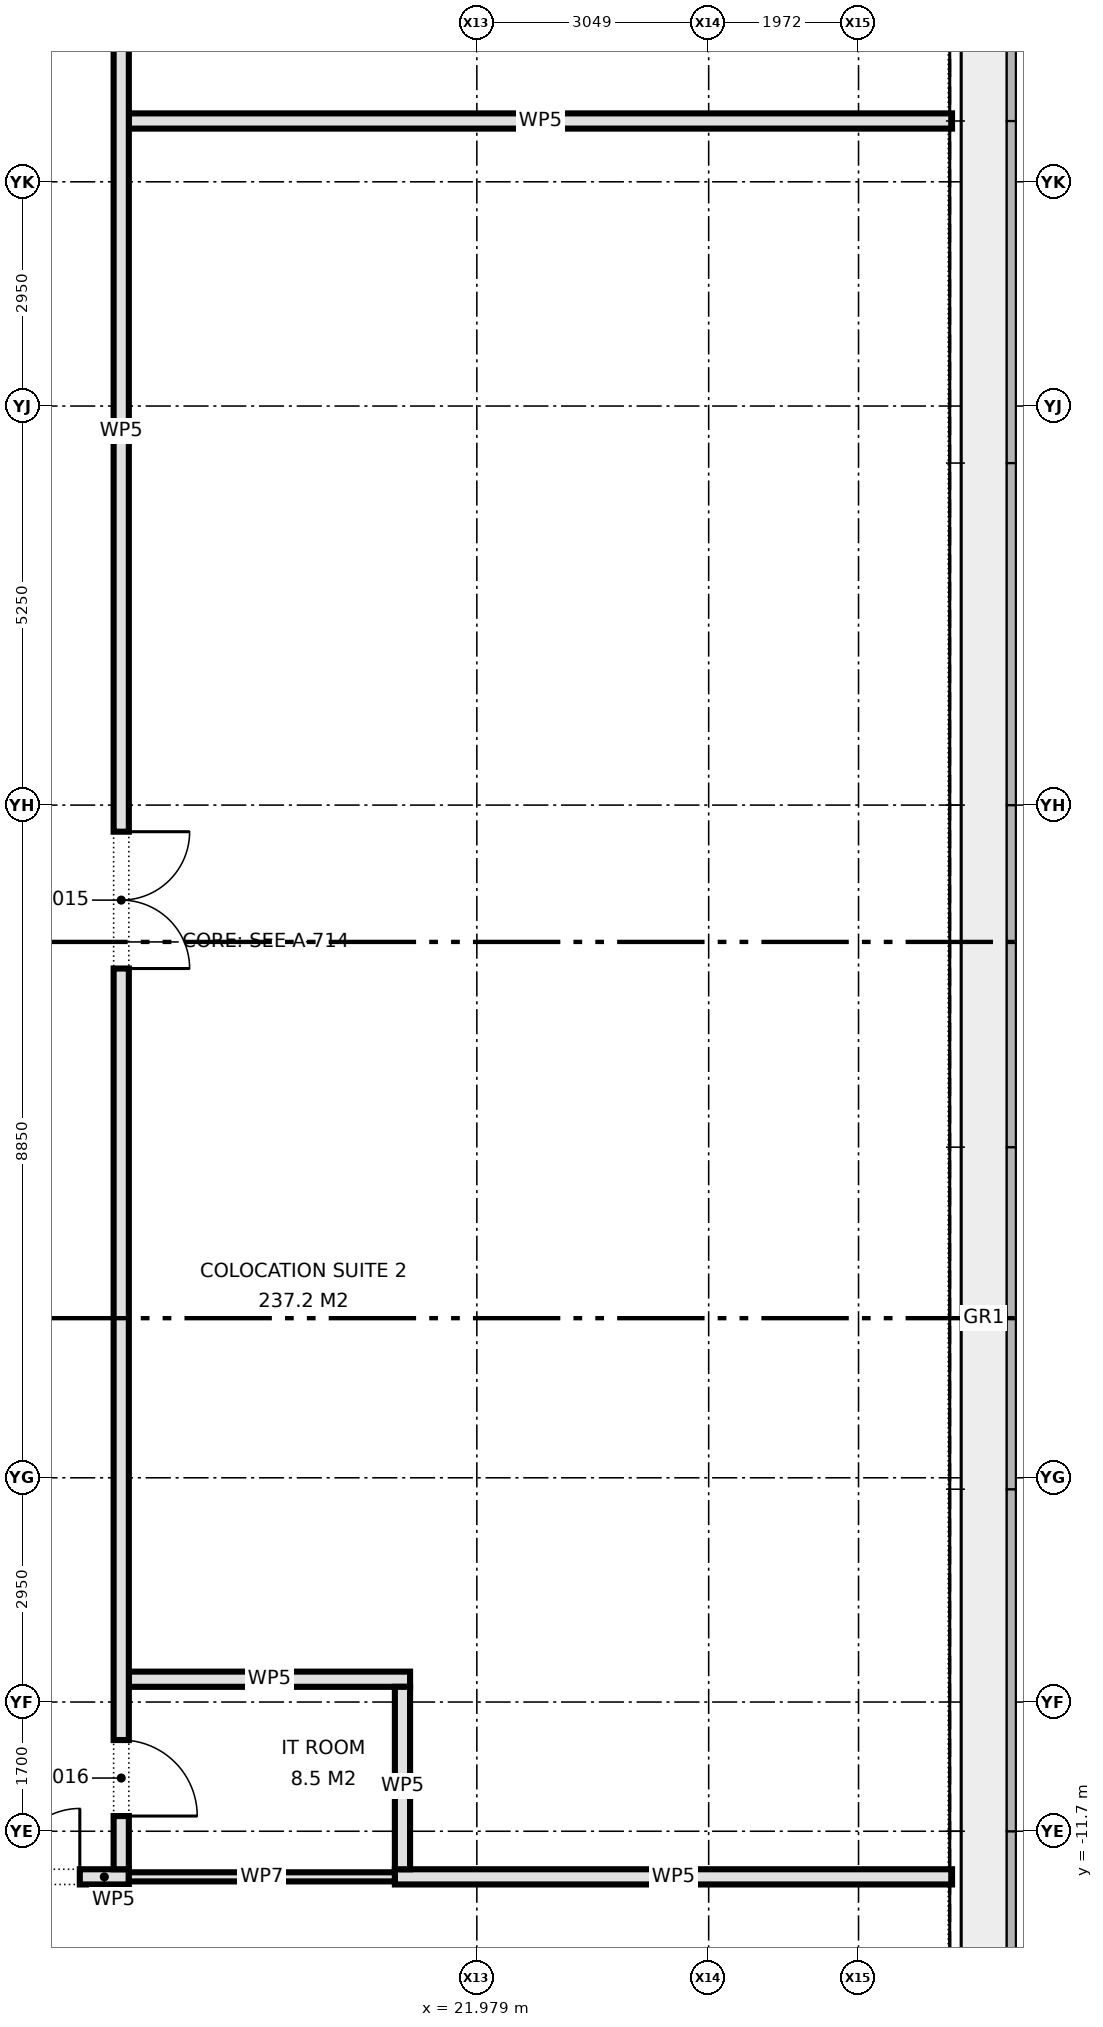
"""IFC4 building model, lengths in metres.
Left out: names, types, materials, properties, quantities, classifications, styles, units other than length and angle.
Written with IfcOpenShell. Run it as: python <this file> out.ifc"""

import sys

from ifc_helpers import new_model, si_unit, direction, frame, frame_2d, origin, place, context, subcontext, project, spatial, rectangle, extrude, element, fill, save


model = new_model("IFC4")
c1 = context("Model", 3, precision=1e-05, world=origin(), true_north=direction((0.0, 1.0)))
c2 = subcontext(c1, "Body", "Model", "MODEL_VIEW")
j1 = project(units=[si_unit("LENGTHUNIT", "METRE"), si_unit("PLANEANGLEUNIT", "RADIAN")], contexts=[c1])
p1 = place(None, origin())
s1 = spatial("IfcSite", under=j1, at=p1, CompositionType="ELEMENT")
p2 = place(p1, origin())
s2 = spatial("IfcBuilding", under=s1, at=p2, CompositionType="ELEMENT")
p3 = place(p2, frame((0.0, 0.0, 104.0)))
s3 = spatial("IfcBuildingStorey", under=s2, at=p3, CompositionType="ELEMENT", Elevation=104.0)
p4 = place(p3, frame((-20.33, -12.3, 0.0), z_axis=(0.0, 0.0, 1.0), x_axis=(1.0, 0.0, 0.0)))
e1 = element("IfcWall", 1, at=p4, inside=s3, PredefinedType="PARTITIONING", context=c2, shape_type="SweptSolid", body=[
    extrude(rectangle(XDim=37.73, YDim=0.2, at=frame_2d((18.865, 0.0))), origin(), (0.0, 0.0, 1.0), 4.2),
])
p5 = place(p4, frame((3.69, 0.0, 0.0)))
e2 = element("IfcOpeningElement", 2, at=p5, cuts=e1, PredefinedType="OPENING", context=c2, shape_type="SweptSolid", body=[
    extrude(rectangle(XDim=1.2, YDim=2.1, at=frame_2d((0.6, 1.05))), frame((0.0, 0.11, 0.0), z_axis=(0.0, -1.0, 0.0), x_axis=(1.0, 0.0, 0.0)), (0.0, 0.0, 1.0), 0.22),
])
p6 = place(p4, frame((12.13, 0.0, 0.0)))
e3 = element("IfcOpeningElement", 3, at=p6, cuts=e1, PredefinedType="OPENING", context=c2, shape_type="SweptSolid", body=[
    extrude(rectangle(XDim=1.8, YDim=2.1, at=frame_2d((0.9, 1.05))), frame((0.0, 0.11, 0.0), z_axis=(0.0, -1.0, 0.0), x_axis=(1.0, 0.0, 0.0)), (0.0, 0.0, 1.0), 0.22),
])
p7 = place(p4, frame((21.43, 0.0, 0.0)))
e4 = element("IfcOpeningElement", 4, at=p7, cuts=e1, PredefinedType="OPENING", context=c2, shape_type="SweptSolid", body=[
    extrude(rectangle(XDim=1.2, YDim=2.1, at=frame_2d((0.6, 1.05))), frame((0.0, 0.11, 0.0), z_axis=(0.0, -1.0, 0.0), x_axis=(1.0, 0.0, 0.0)), (0.0, 0.0, 1.0), 0.22),
])
p8 = place(p4, frame((35.285, 0.0, 0.0)))
e5 = element("IfcOpeningElement", 5, at=p8, cuts=e1, PredefinedType="OPENING", context=c2, shape_type="SweptSolid", body=[
    extrude(rectangle(XDim=1.8, YDim=2.1, at=frame_2d((0.9, 1.05))), frame((0.0, 0.11, 0.0), z_axis=(0.0, -1.0, 0.0), x_axis=(1.0, 0.0, 0.0)), (0.0, 0.0, 1.0), 0.22),
])
p9 = place(p4, frame((27.53, 0.0, 0.0)))
e6 = element("IfcOpeningElement", 6, at=p9, cuts=e1, PredefinedType="OPENING", context=c2, shape_type="SweptSolid", body=[
    extrude(rectangle(XDim=1.0, YDim=2.1, at=frame_2d((0.5, 1.05))), frame((0.0, 0.11, 0.0), z_axis=(0.0, -1.0, 0.0), x_axis=(1.0, 0.0, 0.0)), (0.0, 0.0, 1.0), 0.22),
])
p10 = place(p4, frame((30.53, 0.0, 0.0)))
e7 = element("IfcOpeningElement", 7, at=p10, cuts=e1, PredefinedType="OPENING", context=c2, shape_type="SweptSolid", body=[
    extrude(rectangle(XDim=1.0, YDim=2.1, at=frame_2d((0.5, 1.05))), frame((0.0, 0.11, 0.0), z_axis=(0.0, -1.0, 0.0), x_axis=(1.0, 0.0, 0.0)), (0.0, 0.0, 1.0), 0.22),
])
p11 = place(p4, frame((33.13, 0.0, 0.0)))
e8 = element("IfcOpeningElement", 8, at=p11, cuts=e1, PredefinedType="OPENING", context=c2, shape_type="SweptSolid", body=[
    extrude(rectangle(XDim=1.0, YDim=2.1, at=frame_2d((0.5, 1.05))), frame((0.0, 0.11, 0.0), z_axis=(0.0, -1.0, 0.0), x_axis=(1.0, 0.0, 0.0)), (0.0, 0.0, 1.0), 0.22),
])
p12 = place(p3, frame((20.9, -12.3, 0.0), z_axis=(0.0, 0.0, 1.0), x_axis=(1.0, 0.0, 0.0)))
e9 = element("IfcWall", 9, at=p12, inside=s3, PredefinedType="PARTITIONING", context=c2, shape_type="SweptSolid", body=[
    extrude(rectangle(XDim=7.33, YDim=0.2, at=frame_2d((3.665, 0.0))), origin(), (0.0, 0.0, 1.0), 4.2),
])
p13 = place(p3, frame((17.4, -9.7, 0.0), z_axis=(0.0, 0.0, 1.0), x_axis=(1.0, 0.0, 0.0)))
e10 = element("IfcWall", 10, at=p13, inside=s3, PredefinedType="PARTITIONING", context=c2, shape_type="SweptSolid", body=[
    extrude(rectangle(XDim=3.7, YDim=0.2, at=frame_2d((1.85, 0.0))), origin(), (0.0, 0.0, 1.0), 4.2),
])
p14 = place(p3, frame((17.4, 10.8, 0.0), z_axis=(0.0, 0.0, 1.0), x_axis=(1.0, 0.0, 0.0)))
e11 = element("IfcWall", 11, at=p14, inside=s3, PredefinedType="PARTITIONING", context=c2, shape_type="SweptSolid", body=[
    extrude(rectangle(XDim=10.83, YDim=0.2, at=frame_2d((5.415, 0.0))), origin(), (0.0, 0.0, 1.0), 4.2),
])
p15 = place(p3, frame((21.0, -12.2, 0.0), z_axis=(0.0, 0.0, 1.0), x_axis=(0.0, 1.0, 0.0)))
e12 = element("IfcWall", 12, at=p15, inside=s3, PredefinedType="PARTITIONING", context=c2, shape_type="SweptSolid", body=[
    extrude(rectangle(XDim=2.4, YDim=0.2, at=frame_2d((1.2, 0.0))), origin(), (0.0, 0.0, 1.0), 4.2),
])
p16 = place(p3, frame((17.3, -12.2, 0.0), z_axis=(0.0, 0.0, 1.0), x_axis=(0.0, 1.0, 0.0)))
e13 = element("IfcWall", 13, at=p16, inside=s3, PredefinedType="PARTITIONING", context=c2, shape_type="SweptSolid", body=[
    extrude(rectangle(XDim=24.4, YDim=0.2, at=frame_2d((12.2, 0.0))), origin(), (0.0, 0.0, 1.0), 4.2),
])
p17 = place(p16, frame((11.85, 0.0, 0.0)))
e14 = element("IfcOpeningElement", 14, at=p17, cuts=e13, PredefinedType="OPENING", context=c2, shape_type="SweptSolid", body=[
    extrude(rectangle(XDim=1.8, YDim=2.1, at=frame_2d((0.9, 1.05))), frame((0.0, 0.11, 0.0), z_axis=(0.0, -1.0, 0.0), x_axis=(1.0, 0.0, 0.0)), (0.0, 0.0, 1.0), 0.22),
])
p18 = place(p16, frame((0.7, 0.0, 0.0)))
e15 = element("IfcOpeningElement", 15, at=p18, cuts=e13, PredefinedType="OPENING", context=c2, shape_type="SweptSolid", body=[
    extrude(rectangle(XDim=1.0, YDim=2.1, at=frame_2d((0.5, 1.05))), frame((0.0, 0.11, 0.0), z_axis=(0.0, -1.0, 0.0), x_axis=(1.0, 0.0, 0.0)), (0.0, 0.0, 1.0), 0.22),
])
p19 = place(p3, frame((17.4, -12.3, 0.0), z_axis=(0.0, 0.0, 1.0), x_axis=(1.0, 0.0, 0.0)))
e16 = element("IfcWall", 16, at=p19, inside=s3, PredefinedType="PARTITIONING", context=c2, shape_type="SweptSolid", body=[
    extrude(rectangle(XDim=3.5, YDim=0.12, at=frame_2d((1.75, 0.0))), origin(), (0.0, 0.0, 1.0), 4.2),
])
p20 = place(p8, origin())
e17 = element("IfcDoor", 17, at=p20, inside=s3, OperationType="DOUBLE_DOOR_SINGLE_SWING", PredefinedType="DOOR", context=c2, shape_type="SweptSolid", body=[
    extrude(rectangle(XDim=1.8, YDim=2.1, at=frame_2d((0.9, 1.05))), frame((0.0, 0.025, 0.0), z_axis=(0.0, -1.0, 0.0), x_axis=(1.0, 0.0, 0.0)), (0.0, 0.0, 1.0), 0.05),
])
fill(e5, e17)
p21 = place(p17, frame((1.8, 0.0, 0.0), z_axis=(0.0, 0.0, 1.0), x_axis=(-1.0, 0.0, 0.0)))
e18 = element("IfcDoor", 18, at=p21, inside=s3, OperationType="DOUBLE_DOOR_SINGLE_SWING", PredefinedType="DOOR", context=c2, shape_type="SweptSolid", body=[
    extrude(rectangle(XDim=1.8, YDim=2.1, at=frame_2d((0.9, 1.05))), frame((0.0, 0.025, 0.0), z_axis=(0.0, -1.0, 0.0), x_axis=(1.0, 0.0, 0.0)), (0.0, 0.0, 1.0), 0.05),
])
fill(e14, e18)
p22 = place(p18, frame((1.0, 0.0, 0.0), z_axis=(0.0, 0.0, 1.0), x_axis=(-1.0, 0.0, 0.0)))
e19 = element("IfcDoor", 19, at=p22, inside=s3, OperationType="SINGLE_SWING_RIGHT", PredefinedType="DOOR", context=c2, shape_type="SweptSolid", body=[
    extrude(rectangle(XDim=1.0, YDim=2.1, at=frame_2d((0.5, 1.05))), frame((0.0, 0.025, 0.0), z_axis=(0.0, -1.0, 0.0), x_axis=(1.0, 0.0, 0.0)), (0.0, 0.0, 1.0), 0.05),
])
fill(e15, e19)
save(model, sys.argv[1])
